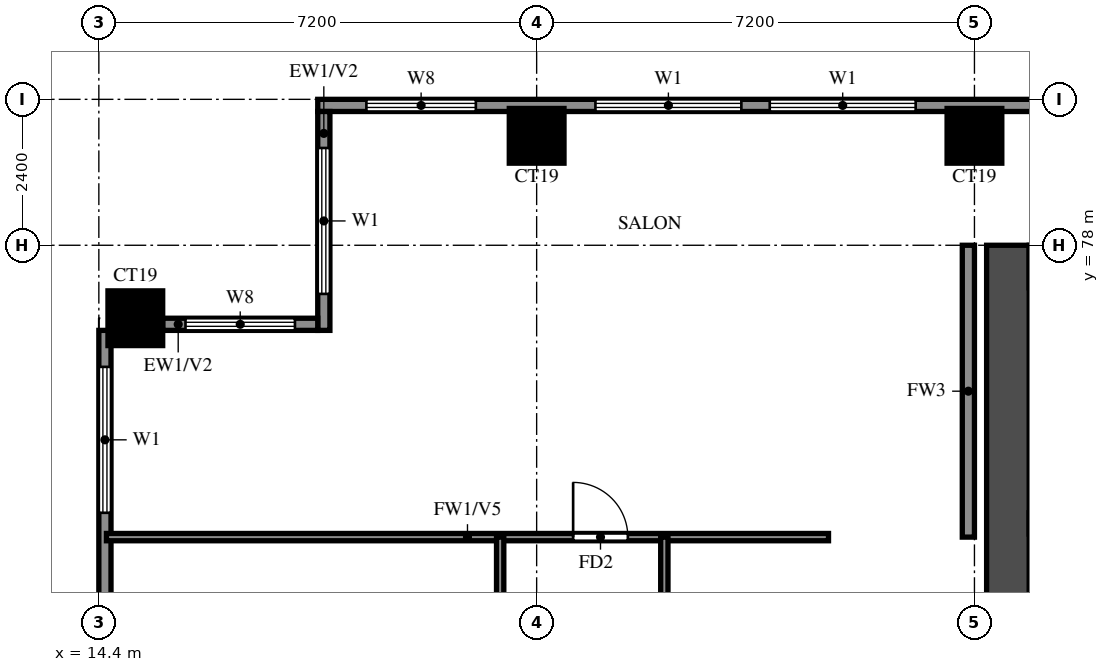
"""IFC4 building model, lengths in metres.
Left out: names, types, materials, properties, quantities, classifications, styles, units other than length and angle.
Written with IfcOpenShell. Run it as: python <this file> out.ifc"""

import sys

from ifc_helpers import new_model, si_unit, direction, frame, frame_2d, origin, origin_2d, place, context, subcontext, project, spatial, rectangle, extrude, source, transform, mapped, element, fill, save


model = new_model("IFC4")
c1 = context("Model", 3, precision=1e-05, world=origin(), true_north=direction((0.0, 1.0)))
c2 = subcontext(c1, "Body", "Model", "MODEL_VIEW")
j1 = project(units=[si_unit("LENGTHUNIT", "METRE"), si_unit("PLANEANGLEUNIT", "RADIAN")], contexts=[c1])
p1 = place(None, origin())
s1 = spatial("IfcSite", under=j1, at=p1, CompositionType="ELEMENT")
p2 = place(p1, origin())
s2 = spatial("IfcBuilding", under=s1, at=p2, CompositionType="ELEMENT")
p3 = place(p2, frame((0.0, 0.0, 113.0)))
s3 = spatial("IfcBuildingStorey", under=s2, at=p3, CompositionType="ELEMENT", Elevation=113.0)
m1 = source(origin(), c2, "Body", "SweptSolid", [
    extrude(rectangle(XDim=0.9, YDim=0.9, at=origin_2d()), origin(), (0.0, 0.0, 1.0), 3.2),
])
for number, where, z_axis, x_axis in (
    (1, (15.0, 76.8, 0.0), (0.0, 0.0, 1.0), (1.0, 0.0, 0.0)),
    (2, (21.6, 79.8, 0.0), (0.0, 0.0, 1.0), (1.0, 0.0, 0.0)),
    (3, (28.8, 79.8, 0.0), (0.0, 0.0, 1.0), (1.0, 0.0, 0.0)),
):
    element("IfcColumn", number, at=place(p3, frame(where, z_axis=z_axis, x_axis=x_axis)), inside=s3, PredefinedType="COLUMN", context=c2, shape_type="MappedRepresentation", body=[
        mapped(m1, transform((0.0, 0.0, 0.0))),
    ])
p4 = place(p3, frame((29.35, 66.1, 0.0), z_axis=(0.0, 0.0, 1.0), x_axis=(0.0, 1.0, 0.0)))
e4 = element("IfcWall", 4, at=p4, inside=s3, PredefinedType="SHEAR", context=c2, shape_type="SweptSolid", body=[
    extrude(rectangle(XDim=11.9, YDim=0.7, at=frame_2d((5.95, 0.0))), origin(), (0.0, 0.0, 1.0), 3.2),
])
p5 = place(p3, frame((82.6, 80.3, 0.0), z_axis=(0.0, 0.0, 1.0), x_axis=(-1.0, 0.0, 0.0)))
e5 = element("IfcWall", 5, at=p5, inside=s3, PredefinedType="SOLIDWALL", context=c2, shape_type="SweptSolid", body=[
    extrude(rectangle(XDim=64.6, YDim=0.2, at=frame_2d((32.3, 0.0))), origin(), (0.0, 0.0, 1.0), 3.2),
])
p6 = place(p5, frame((7.9, 0.0, 0.0)))
e6 = element("IfcOpeningElement", 6, at=p6, cuts=e5, PredefinedType="OPENING", context=c2, shape_type="SweptSolid", body=[
    extrude(rectangle(XDim=1.8, YDim=2.4, at=frame_2d((0.9, 1.2))), frame((0.0, 0.11, 0.0), z_axis=(0.0, -1.0, 0.0), x_axis=(1.0, 0.0, 0.0)), (0.0, 0.0, 1.0), 0.22),
])
p7 = place(p5, frame((54.767, 0.0, 0.6)))
e7 = element("IfcOpeningElement", 7, at=p7, cuts=e5, PredefinedType="OPENING", context=c2, shape_type="SweptSolid", body=[
    extrude(rectangle(XDim=2.4, YDim=2.4, at=frame_2d((1.2, 1.2))), frame((0.0, 0.11, 0.0), z_axis=(0.0, -1.0, 0.0), x_axis=(1.0, 0.0, 0.0)), (0.0, 0.0, 1.0), 0.22),
])
p8 = place(p5, frame((57.633, 0.0, 0.6)))
e8 = element("IfcOpeningElement", 8, at=p8, cuts=e5, PredefinedType="OPENING", context=c2, shape_type="SweptSolid", body=[
    extrude(rectangle(XDim=2.4, YDim=2.4, at=frame_2d((1.2, 1.2))), frame((0.0, 0.11, 0.0), z_axis=(0.0, -1.0, 0.0), x_axis=(1.0, 0.0, 0.0)), (0.0, 0.0, 1.0), 0.22),
])
p9 = place(p5, frame((62.0, 0.0, 0.6)))
e9 = element("IfcOpeningElement", 9, at=p9, cuts=e5, PredefinedType="OPENING", context=c2, shape_type="SweptSolid", body=[
    extrude(rectangle(XDim=1.8, YDim=2.4, at=frame_2d((0.9, 1.2))), frame((0.0, 0.11, 0.0), z_axis=(0.0, -1.0, 0.0), x_axis=(1.0, 0.0, 0.0)), (0.0, 0.0, 1.0), 0.22),
])
p10 = place(p5, frame((0.7, 0.0, 0.6)))
e10 = element("IfcOpeningElement", 10, at=p10, cuts=e5, PredefinedType="OPENING", context=c2, shape_type="SweptSolid", body=[
    extrude(rectangle(XDim=1.8, YDim=2.4, at=frame_2d((0.9, 1.2))), frame((0.0, 0.11, 0.0), z_axis=(0.0, -1.0, 0.0), x_axis=(1.0, 0.0, 0.0)), (0.0, 0.0, 1.0), 0.22),
])
p11 = place(p5, frame((3.9, 0.0, 0.6)))
e11 = element("IfcOpeningElement", 11, at=p11, cuts=e5, PredefinedType="OPENING", context=c2, shape_type="SweptSolid", body=[
    extrude(rectangle(XDim=1.8, YDim=2.4, at=frame_2d((0.9, 1.2))), frame((0.0, 0.11, 0.0), z_axis=(0.0, -1.0, 0.0), x_axis=(1.0, 0.0, 0.0)), (0.0, 0.0, 1.0), 0.22),
])
p12 = place(p5, frame((6.55, 0.0, 0.6)))
e12 = element("IfcOpeningElement", 12, at=p12, cuts=e5, PredefinedType="OPENING", context=c2, shape_type="SweptSolid", body=[
    extrude(rectangle(XDim=0.9, YDim=2.4, at=frame_2d((0.45, 1.2))), frame((0.0, 0.11, 0.0), z_axis=(0.0, -1.0, 0.0), x_axis=(1.0, 0.0, 0.0)), (0.0, 0.0, 1.0), 0.22),
])
p13 = place(p3, frame((18.1, 80.2, 0.0), z_axis=(0.0, 0.0, 1.0), x_axis=(0.0, -1.0, 0.0)))
e13 = element("IfcWall", 13, at=p13, inside=s3, PredefinedType="SOLIDWALL", context=c2, shape_type="SweptSolid", body=[
    extrude(rectangle(XDim=3.6, YDim=0.2, at=frame_2d((1.8, 0.0))), origin(), (0.0, 0.0, 1.0), 3.2),
])
p14 = place(p13, frame((0.6, 0.0, 0.6)))
e14 = element("IfcOpeningElement", 14, at=p14, cuts=e13, PredefinedType="OPENING", context=c2, shape_type="SweptSolid", body=[
    extrude(rectangle(XDim=2.4, YDim=2.4, at=frame_2d((1.2, 1.2))), frame((0.0, 0.11, 0.0), z_axis=(0.0, -1.0, 0.0), x_axis=(1.0, 0.0, 0.0)), (0.0, 0.0, 1.0), 0.22),
])
p15 = place(p3, frame((18.0, 76.7, 0.0), z_axis=(0.0, 0.0, 1.0), x_axis=(-1.0, 0.0, 0.0)))
e15 = element("IfcWall", 15, at=p15, inside=s3, PredefinedType="SOLIDWALL", context=c2, shape_type="SweptSolid", body=[
    extrude(rectangle(XDim=2.55, YDim=0.2, at=frame_2d((1.275, 0.0))), origin(), (0.0, 0.0, 1.0), 3.2),
])
p16 = place(p15, frame((0.375, 0.0, 0.6)))
e16 = element("IfcOpeningElement", 16, at=p16, cuts=e15, PredefinedType="OPENING", context=c2, shape_type="SweptSolid", body=[
    extrude(rectangle(XDim=1.8, YDim=2.4, at=frame_2d((0.9, 1.2))), frame((0.0, 0.11, 0.0), z_axis=(0.0, -1.0, 0.0), x_axis=(1.0, 0.0, 0.0)), (0.0, 0.0, 1.0), 0.22),
])
p17 = place(p3, frame((14.5, 76.6, 0.0), z_axis=(0.0, 0.0, 1.0), x_axis=(0.0, -1.0, 0.0)))
e17 = element("IfcWall", 17, at=p17, inside=s3, PredefinedType="SOLIDWALL", context=c2, shape_type="SweptSolid", body=[
    extrude(rectangle(XDim=33.4, YDim=0.2, at=frame_2d((16.7, 0.0))), origin(), (0.0, 0.0, 1.0), 3.2),
])
p18 = place(p17, frame((29.9, 0.0, 0.6)))
e18 = element("IfcOpeningElement", 18, at=p18, cuts=e17, PredefinedType="OPENING", context=c2, shape_type="SweptSolid", body=[
    extrude(rectangle(XDim=2.4, YDim=2.4, at=frame_2d((1.2, 1.2))), frame((0.0, 0.11, 0.0), z_axis=(0.0, -1.0, 0.0), x_axis=(1.0, 0.0, 0.0)), (0.0, 0.0, 1.0), 0.22),
])
p19 = place(p17, frame((25.4, 0.0, 0.6)))
e19 = element("IfcOpeningElement", 19, at=p19, cuts=e17, PredefinedType="OPENING", context=c2, shape_type="SweptSolid", body=[
    extrude(rectangle(XDim=2.4, YDim=2.4, at=frame_2d((1.2, 1.2))), frame((0.0, 0.11, 0.0), z_axis=(0.0, -1.0, 0.0), x_axis=(1.0, 0.0, 0.0)), (0.0, 0.0, 1.0), 0.22),
])
p20 = place(p17, frame((18.2, 0.0, 0.6)))
e20 = element("IfcOpeningElement", 20, at=p20, cuts=e17, PredefinedType="OPENING", context=c2, shape_type="SweptSolid", body=[
    extrude(rectangle(XDim=2.4, YDim=2.4, at=frame_2d((1.2, 1.2))), frame((0.0, 0.11, 0.0), z_axis=(0.0, -1.0, 0.0), x_axis=(1.0, 0.0, 0.0)), (0.0, 0.0, 1.0), 0.22),
])
p21 = place(p17, frame((22.5, 0.0, 0.6)))
e21 = element("IfcOpeningElement", 21, at=p21, cuts=e17, PredefinedType="OPENING", context=c2, shape_type="SweptSolid", body=[
    extrude(rectangle(XDim=1.8, YDim=2.4, at=frame_2d((0.9, 1.2))), frame((0.0, 0.11, 0.0), z_axis=(0.0, -1.0, 0.0), x_axis=(1.0, 0.0, 0.0)), (0.0, 0.0, 1.0), 0.22),
])
p22 = place(p17, frame((15.3, 0.0, 0.6)))
e22 = element("IfcOpeningElement", 22, at=p22, cuts=e17, PredefinedType="OPENING", context=c2, shape_type="SweptSolid", body=[
    extrude(rectangle(XDim=1.8, YDim=2.4, at=frame_2d((0.9, 1.2))), frame((0.0, 0.11, 0.0), z_axis=(0.0, -1.0, 0.0), x_axis=(1.0, 0.0, 0.0)), (0.0, 0.0, 1.0), 0.22),
])
p23 = place(p17, frame((11.0, 0.0, 0.6)))
e23 = element("IfcOpeningElement", 23, at=p23, cuts=e17, PredefinedType="OPENING", context=c2, shape_type="SweptSolid", body=[
    extrude(rectangle(XDim=2.4, YDim=2.4, at=frame_2d((1.2, 1.2))), frame((0.0, 0.11, 0.0), z_axis=(0.0, -1.0, 0.0), x_axis=(1.0, 0.0, 0.0)), (0.0, 0.0, 1.0), 0.22),
])
p24 = place(p17, frame((7.8, 0.0, 0.6)))
e24 = element("IfcOpeningElement", 24, at=p24, cuts=e17, PredefinedType="OPENING", context=c2, shape_type="SweptSolid", body=[
    extrude(rectangle(XDim=2.4, YDim=2.4, at=frame_2d((1.2, 1.2))), frame((0.0, 0.11, 0.0), z_axis=(0.0, -1.0, 0.0), x_axis=(1.0, 0.0, 0.0)), (0.0, 0.0, 1.0), 0.22),
])
p25 = place(p17, frame((4.55, 0.0, 1.5)))
e25 = element("IfcOpeningElement", 25, at=p25, cuts=e17, PredefinedType="OPENING", context=c2, shape_type="SweptSolid", body=[
    extrude(rectangle(XDim=0.9, YDim=0.9, at=frame_2d((0.45, 0.45))), frame((0.0, 0.11, 0.0), z_axis=(0.0, -1.0, 0.0), x_axis=(1.0, 0.0, 0.0)), (0.0, 0.0, 1.0), 0.22),
])
p26 = place(p17, frame((0.6, 0.0, 0.6)))
e26 = element("IfcOpeningElement", 26, at=p26, cuts=e17, PredefinedType="OPENING", context=c2, shape_type="SweptSolid", body=[
    extrude(rectangle(XDim=2.4, YDim=2.4, at=frame_2d((1.2, 1.2))), frame((0.0, 0.11, 0.0), z_axis=(0.0, -1.0, 0.0), x_axis=(1.0, 0.0, 0.0)), (0.0, 0.0, 1.0), 0.22),
])
p27 = place(p3, frame((28.7, 73.2, 0.0), z_axis=(0.0, 0.0, 1.0), x_axis=(0.0, 1.0, 0.0)))
e27 = element("IfcWall", 27, at=p27, inside=s3, PredefinedType="SOLIDWALL", context=c2, shape_type="SweptSolid", body=[
    extrude(rectangle(XDim=4.8, YDim=0.2, at=frame_2d((2.4, 0.0))), origin(), (0.0, 0.0, 1.0), 3.2),
])
p28 = place(p3, frame((14.525, 73.2, 0.0), z_axis=(0.0, 0.0, 1.0), x_axis=(1.0, 0.0, 0.0)))
e28 = element("IfcWall", 28, at=p28, inside=s3, PredefinedType="PARTITIONING", context=c2, shape_type="SweptSolid", body=[
    extrude(rectangle(XDim=11.875, YDim=0.12, at=frame_2d((5.938, 0.0))), origin(), (0.0, 0.0, 1.0), 2.3),
])
p29 = place(p28, frame((7.675, 0.0, 0.0)))
e29 = element("IfcOpeningElement", 29, at=p29, cuts=e28, PredefinedType="OPENING", context=c2, shape_type="SweptSolid", body=[
    extrude(rectangle(XDim=0.9, YDim=2.1, at=frame_2d((0.45, 1.05))), frame((0.0, 0.07, 0.0), z_axis=(0.0, -1.0, 0.0), x_axis=(1.0, 0.0, 0.0)), (0.0, 0.0, 1.0), 0.14),
])
p30 = place(p3, frame((21.0, 69.6, 0.0), z_axis=(0.0, 0.0, 1.0), x_axis=(0.0, 1.0, 0.0)))
e30 = element("IfcWall", 30, at=p30, inside=s3, PredefinedType="PARTITIONING", context=c2, shape_type="SweptSolid", body=[
    extrude(rectangle(XDim=3.6, YDim=0.12, at=frame_2d((1.8, 0.0))), origin(), (0.0, 0.0, 1.0), 3.2),
])
p31 = place(p3, frame((23.7, 64.8, 0.0), z_axis=(0.0, 0.0, 1.0), x_axis=(0.0, 1.0, 0.0)))
e31 = element("IfcWall", 31, at=p31, inside=s3, PredefinedType="PARTITIONING", context=c2, shape_type="SweptSolid", body=[
    extrude(rectangle(XDim=8.4, YDim=0.12, at=frame_2d((4.2, 0.0))), origin(), (0.0, 0.0, 1.0), 3.2),
])
p32 = place(p31, frame((5.05, 0.0, 0.0)))
e32 = element("IfcOpeningElement", 32, at=p32, cuts=e31, PredefinedType="OPENING", context=c2, shape_type="SweptSolid", body=[
    extrude(rectangle(XDim=0.9, YDim=2.1, at=frame_2d((0.45, 1.05))), frame((0.0, 0.07, 0.0), z_axis=(0.0, -1.0, 0.0), x_axis=(1.0, 0.0, 0.0)), (0.0, 0.0, 1.0), 0.14),
])
p33 = place(p7, origin())
e33 = element("IfcWindow", 33, at=p33, inside=s3, PartitioningType="DOUBLE_PANEL_VERTICAL", PredefinedType="WINDOW", context=c2, shape_type="SweptSolid", body=[
    extrude(rectangle(XDim=2.4, YDim=2.4, at=frame_2d((1.2, 1.2))), frame((0.0, 0.03, 0.0), z_axis=(0.0, -1.0, 0.0), x_axis=(1.0, 0.0, 0.0)), (0.0, 0.0, 1.0), 0.06),
])
fill(e7, e33)
p34 = place(p8, origin())
e34 = element("IfcWindow", 34, at=p34, inside=s3, PartitioningType="DOUBLE_PANEL_VERTICAL", PredefinedType="WINDOW", context=c2, shape_type="SweptSolid", body=[
    extrude(rectangle(XDim=2.4, YDim=2.4, at=frame_2d((1.2, 1.2))), frame((0.0, 0.03, 0.0), z_axis=(0.0, -1.0, 0.0), x_axis=(1.0, 0.0, 0.0)), (0.0, 0.0, 1.0), 0.06),
])
fill(e8, e34)
p35 = place(p9, origin())
e35 = element("IfcWindow", 35, at=p35, inside=s3, PartitioningType="DOUBLE_PANEL_VERTICAL", PredefinedType="WINDOW", context=c2, shape_type="SweptSolid", body=[
    extrude(rectangle(XDim=1.8, YDim=2.4, at=frame_2d((0.9, 1.2))), frame((0.0, 0.03, 0.0), z_axis=(0.0, -1.0, 0.0), x_axis=(1.0, 0.0, 0.0)), (0.0, 0.0, 1.0), 0.06),
])
fill(e9, e35)
p36 = place(p14, origin())
e36 = element("IfcWindow", 36, at=p36, inside=s3, PartitioningType="DOUBLE_PANEL_VERTICAL", PredefinedType="WINDOW", context=c2, shape_type="SweptSolid", body=[
    extrude(rectangle(XDim=2.4, YDim=2.4, at=frame_2d((1.2, 1.2))), frame((0.0, 0.03, 0.0), z_axis=(0.0, -1.0, 0.0), x_axis=(1.0, 0.0, 0.0)), (0.0, 0.0, 1.0), 0.06),
])
fill(e14, e36)
p37 = place(p16, origin())
e37 = element("IfcWindow", 37, at=p37, inside=s3, PartitioningType="DOUBLE_PANEL_VERTICAL", PredefinedType="WINDOW", context=c2, shape_type="SweptSolid", body=[
    extrude(rectangle(XDim=1.8, YDim=2.4, at=frame_2d((0.9, 1.2))), frame((0.0, 0.03, 0.0), z_axis=(0.0, -1.0, 0.0), x_axis=(1.0, 0.0, 0.0)), (0.0, 0.0, 1.0), 0.06),
])
fill(e16, e37)
p38 = place(p26, origin())
e38 = element("IfcWindow", 38, at=p38, inside=s3, PartitioningType="DOUBLE_PANEL_VERTICAL", PredefinedType="WINDOW", context=c2, shape_type="SweptSolid", body=[
    extrude(rectangle(XDim=2.4, YDim=2.4, at=frame_2d((1.2, 1.2))), frame((0.0, 0.03, 0.0), z_axis=(0.0, -1.0, 0.0), x_axis=(1.0, 0.0, 0.0)), (0.0, 0.0, 1.0), 0.06),
])
fill(e26, e38)
p39 = place(p29, origin())
e39 = element("IfcDoor", 39, at=p39, inside=s3, OperationType="SINGLE_SWING_RIGHT", PredefinedType="DOOR", context=c2, shape_type="SweptSolid", body=[
    extrude(rectangle(XDim=0.9, YDim=2.1, at=frame_2d((0.45, 1.05))), frame((0.0, 0.025, 0.0), z_axis=(0.0, -1.0, 0.0), x_axis=(1.0, 0.0, 0.0)), (0.0, 0.0, 1.0), 0.05),
])
fill(e29, e39)
save(model, sys.argv[1])
